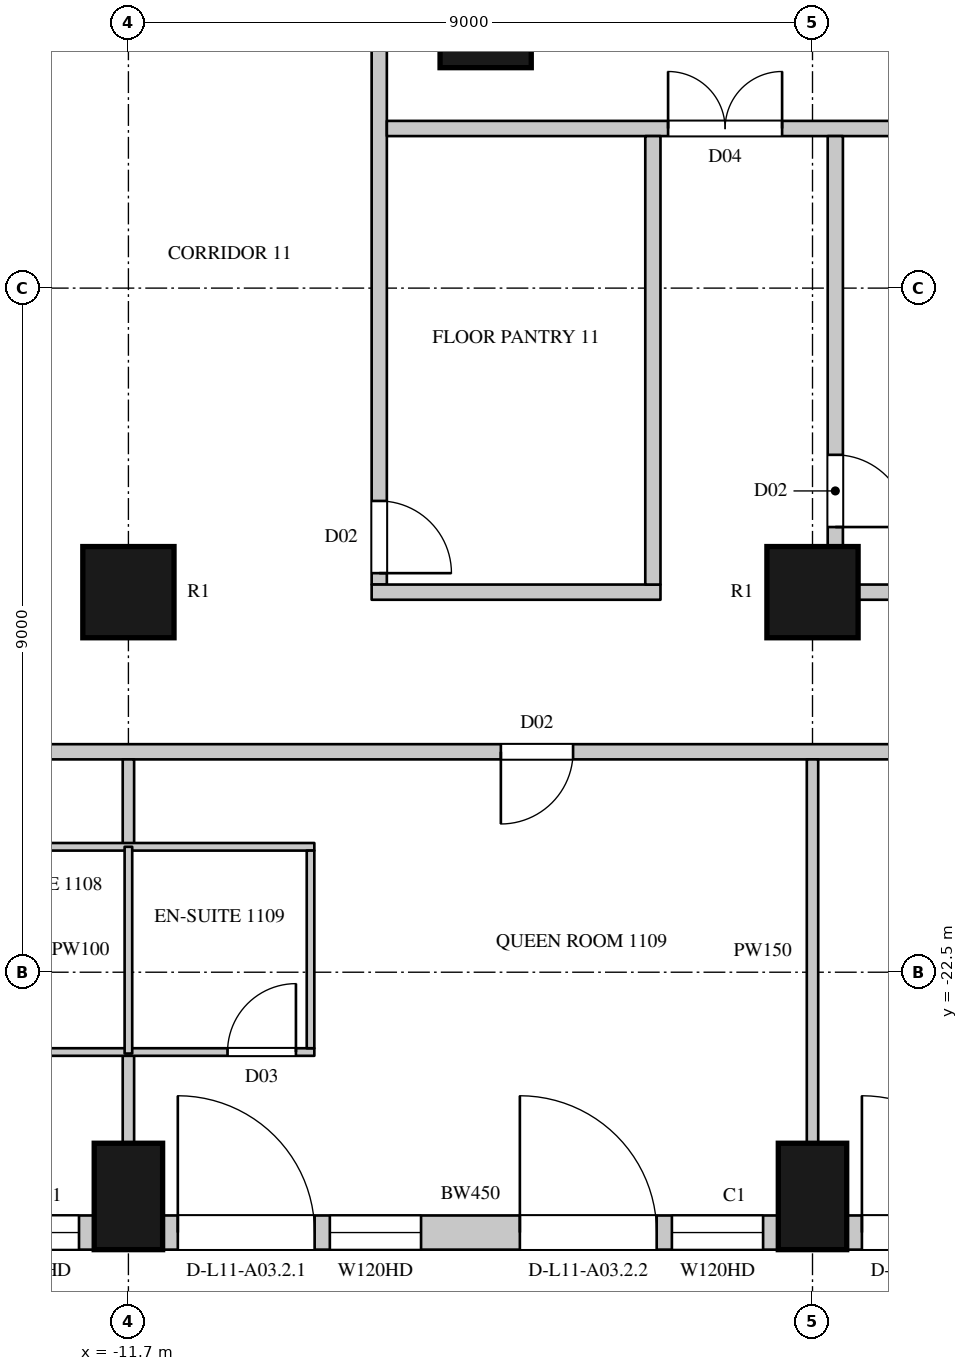
"""IFC4 building model, lengths in metres.
Left out: names, types, materials, properties, quantities, classifications, styles, units other than length and angle.
Written with IfcOpenShell. Run it as: python <this file> out.ifc"""

import sys

from ifc_helpers import new_model, si_unit, direction, frame, frame_2d, origin, origin_2d, place, context, subcontext, project, spatial, rectangle, circle, extrude, element, fill, save


model = new_model("IFC4")
c1 = context("Model", 3, precision=1e-05, world=origin(), true_north=direction((0.0, 1.0)))
c2 = subcontext(c1, "Body", "Model", "MODEL_VIEW")
j1 = project(units=[si_unit("LENGTHUNIT", "METRE"), si_unit("PLANEANGLEUNIT", "RADIAN")], contexts=[c1])
p1 = place(None, origin())
s1 = spatial("IfcSite", under=j1, at=p1, CompositionType="ELEMENT")
p2 = place(p1, origin())
s2 = spatial("IfcBuilding", under=s1, at=p2, CompositionType="ELEMENT")
p3 = place(p2, frame((0.0, 0.0, 69.9)))
s3 = spatial("IfcBuildingStorey", under=s2, at=p3, CompositionType="ELEMENT", Elevation=69.9)
for number, where, z_axis, x_axis in (
    (1, (-11.7, -25.45, 0.0), (0.0, 0.0, 1.0), (1.0, 0.0, 0.0)),
    (2, (-2.7, -25.45, 0.0), (0.0, 0.0, 1.0), (1.0, 0.0, 0.0)),
):
    element("IfcColumn", number, at=place(p3, frame(where, z_axis=z_axis, x_axis=x_axis)), inside=s3, PredefinedType="COLUMN", context=c2, shape_type="SweptSolid", body=[
        extrude(rectangle(XDim=0.9, YDim=1.4, at=origin_2d()), origin(), (0.0, 0.0, 1.0), 3.6),
    ])
for number, where, z_axis, x_axis in (
    (3, (-11.7, -17.5, 0.0), (0.0, 0.0, 1.0), (1.0, 0.0, 0.0)),
    (4, (-2.7, -17.5, 0.0), (0.0, 0.0, 1.0), (1.0, 0.0, 0.0)),
    (5, (-7.0, -10.0, 0.0), (0.0, 0.0, 1.0), (1.0, 0.0, 0.0)),
):
    element("IfcColumn", number, at=place(p3, frame(where, z_axis=z_axis, x_axis=x_axis)), inside=s3, PredefinedType="COLUMN", context=c2, shape_type="SweptSolid", body=[
        extrude(circle(Radius=0.6, at=origin_2d()), origin(), (0.0, 0.0, 1.0), 3.6),
    ])
p4 = place(p3, frame((-20.25, -25.925, 0.0), z_axis=(0.0, 0.0, 1.0), x_axis=(1.0, 0.0, 0.0)))
e6 = element("IfcWall", 6, at=p4, inside=s3, PredefinedType="SOLIDWALL", context=c2, shape_type="SweptSolid", body=[
    extrude(rectangle(XDim=8.1, YDim=0.45, at=frame_2d((4.05, 0.0))), origin(), (0.0, 0.0, 1.0), 3.3),
])
p5 = place(p4, frame((0.2, 0.0, 0.0)))
e7 = element("IfcOpeningElement", 7, at=p5, cuts=e6, PredefinedType="OPENING", context=c2, shape_type="SweptSolid", body=[
    extrude(rectangle(XDim=1.8, YDim=2.4, at=frame_2d((0.9, 1.2))), frame((0.0, 0.235, 0.0), z_axis=(0.0, -1.0, 0.0), x_axis=(1.0, 0.0, 0.0)), (0.0, 0.0, 1.0), 0.47),
])
p6 = place(p4, frame((2.2, 0.0, 1.05)))
e8 = element("IfcOpeningElement", 8, at=p6, cuts=e6, PredefinedType="OPENING", context=c2, shape_type="SweptSolid", body=[
    extrude(rectangle(XDim=1.2, YDim=2.0, at=frame_2d((0.6, 1.0))), frame((0.0, 0.235, 0.0), z_axis=(0.0, -1.0, 0.0), x_axis=(1.0, 0.0, 0.0)), (0.0, 0.0, 1.0), 0.47),
])
p7 = place(p4, frame((4.7, 0.0, 0.0)))
e9 = element("IfcOpeningElement", 9, at=p7, cuts=e6, PredefinedType="OPENING", context=c2, shape_type="SweptSolid", body=[
    extrude(rectangle(XDim=1.8, YDim=2.4, at=frame_2d((0.9, 1.2))), frame((0.0, 0.235, 0.0), z_axis=(0.0, -1.0, 0.0), x_axis=(1.0, 0.0, 0.0)), (0.0, 0.0, 1.0), 0.47),
])
p8 = place(p4, frame((6.7, 0.0, 1.05)))
e10 = element("IfcOpeningElement", 10, at=p8, cuts=e6, PredefinedType="OPENING", context=c2, shape_type="SweptSolid", body=[
    extrude(rectangle(XDim=1.2, YDim=2.0, at=frame_2d((0.6, 1.0))), frame((0.0, 0.235, 0.0), z_axis=(0.0, -1.0, 0.0), x_axis=(1.0, 0.0, 0.0)), (0.0, 0.0, 1.0), 0.47),
])
p9 = place(p3, frame((-11.25, -25.925, 0.0), z_axis=(0.0, 0.0, 1.0), x_axis=(1.0, 0.0, 0.0)))
e11 = element("IfcWall", 11, at=p9, inside=s3, PredefinedType="SOLIDWALL", context=c2, shape_type="SweptSolid", body=[
    extrude(rectangle(XDim=8.1, YDim=0.45, at=frame_2d((4.05, 0.0))), origin(), (0.0, 0.0, 1.0), 3.3),
])
p10 = place(p9, frame((0.2, 0.0, 0.0)))
e12 = element("IfcOpeningElement", 12, at=p10, cuts=e11, PredefinedType="OPENING", context=c2, shape_type="SweptSolid", body=[
    extrude(rectangle(XDim=1.8, YDim=2.4, at=frame_2d((0.9, 1.2))), frame((0.0, 0.235, 0.0), z_axis=(0.0, -1.0, 0.0), x_axis=(1.0, 0.0, 0.0)), (0.0, 0.0, 1.0), 0.47),
])
p11 = place(p9, frame((2.2, 0.0, 1.05)))
e13 = element("IfcOpeningElement", 13, at=p11, cuts=e11, PredefinedType="OPENING", context=c2, shape_type="SweptSolid", body=[
    extrude(rectangle(XDim=1.2, YDim=2.0, at=frame_2d((0.6, 1.0))), frame((0.0, 0.235, 0.0), z_axis=(0.0, -1.0, 0.0), x_axis=(1.0, 0.0, 0.0)), (0.0, 0.0, 1.0), 0.47),
])
p12 = place(p9, frame((4.7, 0.0, 0.0)))
e14 = element("IfcOpeningElement", 14, at=p12, cuts=e11, PredefinedType="OPENING", context=c2, shape_type="SweptSolid", body=[
    extrude(rectangle(XDim=1.8, YDim=2.4, at=frame_2d((0.9, 1.2))), frame((0.0, 0.235, 0.0), z_axis=(0.0, -1.0, 0.0), x_axis=(1.0, 0.0, 0.0)), (0.0, 0.0, 1.0), 0.47),
])
p13 = place(p9, frame((6.7, 0.0, 1.05)))
e15 = element("IfcOpeningElement", 15, at=p13, cuts=e11, PredefinedType="OPENING", context=c2, shape_type="SweptSolid", body=[
    extrude(rectangle(XDim=1.2, YDim=2.0, at=frame_2d((0.6, 1.0))), frame((0.0, 0.235, 0.0), z_axis=(0.0, -1.0, 0.0), x_axis=(1.0, 0.0, 0.0)), (0.0, 0.0, 1.0), 0.47),
])
p14 = place(p3, frame((-2.25, -25.925, 0.0), z_axis=(0.0, 0.0, 1.0), x_axis=(1.0, 0.0, 0.0)))
e16 = element("IfcWall", 16, at=p14, inside=s3, PredefinedType="SOLIDWALL", context=c2, shape_type="SweptSolid", body=[
    extrude(rectangle(XDim=8.1, YDim=0.45, at=frame_2d((4.05, 0.0))), origin(), (0.0, 0.0, 1.0), 3.3),
])
p15 = place(p14, frame((0.2, 0.0, 0.0)))
e17 = element("IfcOpeningElement", 17, at=p15, cuts=e16, PredefinedType="OPENING", context=c2, shape_type="SweptSolid", body=[
    extrude(rectangle(XDim=1.8, YDim=2.4, at=frame_2d((0.9, 1.2))), frame((0.0, 0.235, 0.0), z_axis=(0.0, -1.0, 0.0), x_axis=(1.0, 0.0, 0.0)), (0.0, 0.0, 1.0), 0.47),
])
p16 = place(p14, frame((2.2, 0.0, 1.05)))
e18 = element("IfcOpeningElement", 18, at=p16, cuts=e16, PredefinedType="OPENING", context=c2, shape_type="SweptSolid", body=[
    extrude(rectangle(XDim=1.2, YDim=2.0, at=frame_2d((0.6, 1.0))), frame((0.0, 0.235, 0.0), z_axis=(0.0, -1.0, 0.0), x_axis=(1.0, 0.0, 0.0)), (0.0, 0.0, 1.0), 0.47),
])
p17 = place(p14, frame((4.7, 0.0, 0.0)))
e19 = element("IfcOpeningElement", 19, at=p17, cuts=e16, PredefinedType="OPENING", context=c2, shape_type="SweptSolid", body=[
    extrude(rectangle(XDim=1.8, YDim=2.4, at=frame_2d((0.9, 1.2))), frame((0.0, 0.235, 0.0), z_axis=(0.0, -1.0, 0.0), x_axis=(1.0, 0.0, 0.0)), (0.0, 0.0, 1.0), 0.47),
])
p18 = place(p14, frame((6.7, 0.0, 1.05)))
e20 = element("IfcOpeningElement", 20, at=p18, cuts=e16, PredefinedType="OPENING", context=c2, shape_type="SweptSolid", body=[
    extrude(rectangle(XDim=1.2, YDim=2.0, at=frame_2d((0.6, 1.0))), frame((0.0, 0.235, 0.0), z_axis=(0.0, -1.0, 0.0), x_axis=(1.0, 0.0, 0.0)), (0.0, 0.0, 1.0), 0.47),
])
p19 = place(p3, frame((-20.7, -19.6, 0.0), z_axis=(0.0, 0.0, 1.0), x_axis=(1.0, 0.0, 0.0)))
e21 = element("IfcWall", 21, at=p19, inside=s3, PredefinedType="PARTITIONING", context=c2, shape_type="SweptSolid", body=[
    extrude(rectangle(XDim=38.825, YDim=0.2, at=frame_2d((19.413, 0.0))), origin(), (0.0, 0.0, 1.0), 3.3),
])
p20 = place(p19, frame((3.15, 0.0, 0.0)))
e22 = element("IfcOpeningElement", 22, at=p20, cuts=e21, PredefinedType="OPENING", context=c2, shape_type="SweptSolid", body=[
    extrude(rectangle(XDim=0.95, YDim=2.2, at=frame_2d((0.475, 1.1))), frame((0.0, 0.11, 0.0), z_axis=(0.0, -1.0, 0.0), x_axis=(1.0, 0.0, 0.0)), (0.0, 0.0, 1.0), 0.22),
])
p21 = place(p19, frame((13.9, 0.0, 0.0)))
e23 = element("IfcOpeningElement", 23, at=p21, cuts=e21, PredefinedType="OPENING", context=c2, shape_type="SweptSolid", body=[
    extrude(rectangle(XDim=0.95, YDim=2.2, at=frame_2d((0.475, 1.1))), frame((0.0, 0.11, 0.0), z_axis=(0.0, -1.0, 0.0), x_axis=(1.0, 0.0, 0.0)), (0.0, 0.0, 1.0), 0.22),
])
p22 = place(p19, frame((21.15, 0.0, 0.0)))
e24 = element("IfcOpeningElement", 24, at=p22, cuts=e21, PredefinedType="OPENING", context=c2, shape_type="SweptSolid", body=[
    extrude(rectangle(XDim=0.95, YDim=2.2, at=frame_2d((0.475, 1.1))), frame((0.0, 0.11, 0.0), z_axis=(0.0, -1.0, 0.0), x_axis=(1.0, 0.0, 0.0)), (0.0, 0.0, 1.0), 0.22),
])
p23 = place(p19, frame((29.75, 0.0, 0.0)))
e25 = element("IfcOpeningElement", 25, at=p23, cuts=e21, PredefinedType="OPENING", context=c2, shape_type="SweptSolid", body=[
    extrude(rectangle(XDim=1.1, YDim=2.4, at=frame_2d((0.55, 1.2))), frame((0.0, 0.11, 0.0), z_axis=(0.0, -1.0, 0.0), x_axis=(1.0, 0.0, 0.0)), (0.0, 0.0, 1.0), 0.22),
])
p24 = place(p3, frame((-8.4, -17.4, 0.0), z_axis=(0.0, 0.0, 1.0), x_axis=(0.0, 1.0, 0.0)))
e26 = element("IfcWall", 26, at=p24, inside=s3, PredefinedType="PARTITIONING", context=c2, shape_type="SweptSolid", body=[
    extrude(rectangle(XDim=34.8, YDim=0.2, at=frame_2d((17.4, 0.0))), origin(), (0.0, 0.0, 1.0), 3.3),
])
p25 = place(p24, frame((21.15, 0.0, 0.0)))
e27 = element("IfcOpeningElement", 27, at=p25, cuts=e26, PredefinedType="OPENING", context=c2, shape_type="SweptSolid", body=[
    extrude(rectangle(XDim=1.5, YDim=2.2, at=frame_2d((0.75, 1.1))), frame((0.0, 0.11, 0.0), z_axis=(0.0, -1.0, 0.0), x_axis=(1.0, 0.0, 0.0)), (0.0, 0.0, 1.0), 0.22),
])
p26 = place(p24, frame((33.75, 0.0, 0.0)))
e28 = element("IfcOpeningElement", 28, at=p26, cuts=e26, PredefinedType="OPENING", context=c2, shape_type="SweptSolid", body=[
    extrude(rectangle(XDim=0.9, YDim=2.2, at=frame_2d((0.45, 1.1))), frame((0.0, 0.11, 0.0), z_axis=(0.0, -1.0, 0.0), x_axis=(1.0, 0.0, 0.0)), (0.0, 0.0, 1.0), 0.22),
])
p27 = place(p24, frame((0.15, 0.0, 0.0)))
e29 = element("IfcOpeningElement", 29, at=p27, cuts=e26, PredefinedType="OPENING", context=c2, shape_type="SweptSolid", body=[
    extrude(rectangle(XDim=0.95, YDim=2.2, at=frame_2d((0.475, 1.1))), frame((0.0, 0.11, 0.0), z_axis=(0.0, -1.0, 0.0), x_axis=(1.0, 0.0, 0.0)), (0.0, 0.0, 1.0), 0.22),
])
p28 = place(p3, frame((-8.5, -17.5, 0.0), z_axis=(0.0, 0.0, 1.0), x_axis=(1.0, 0.0, 0.0)))
e30 = element("IfcWall", 30, at=p28, inside=s3, PredefinedType="PARTITIONING", context=c2, shape_type="SweptSolid", body=[
    extrude(rectangle(XDim=3.8, YDim=0.2, at=frame_2d((1.9, 0.0))), origin(), (0.0, 0.0, 1.0), 2.75),
])
p29 = place(p3, frame((-8.3, -11.4, 0.0), z_axis=(0.0, 0.0, 1.0), x_axis=(1.0, 0.0, 0.0)))
e31 = element("IfcWall", 31, at=p29, inside=s3, PredefinedType="PARTITIONING", context=c2, shape_type="SweptSolid", body=[
    extrude(rectangle(XDim=18.6, YDim=0.2, at=frame_2d((9.3, 0.0))), origin(), (0.0, 0.0, 1.0), 3.3),
])
p30 = place(p29, frame((3.7, 0.0, 0.0)))
e32 = element("IfcOpeningElement", 32, at=p30, cuts=e31, PredefinedType="OPENING", context=c2, shape_type="SweptSolid", body=[
    extrude(rectangle(XDim=1.5, YDim=2.2, at=frame_2d((0.75, 1.1))), frame((0.0, 0.11, 0.0), z_axis=(0.0, -1.0, 0.0), x_axis=(1.0, 0.0, 0.0)), (0.0, 0.0, 1.0), 0.22),
])
p31 = place(p3, frame((-4.8, -17.4, 0.0), z_axis=(0.0, 0.0, 1.0), x_axis=(0.0, 1.0, 0.0)))
e33 = element("IfcWall", 33, at=p31, inside=s3, PredefinedType="PARTITIONING", context=c2, shape_type="SweptSolid", body=[
    extrude(rectangle(XDim=5.9, YDim=0.2, at=frame_2d((2.95, 0.0))), origin(), (0.0, 0.0, 1.0), 3.3),
])
p32 = place(p3, frame((-2.4, -16.943, 0.0), z_axis=(0.0, 0.0, 1.0), x_axis=(0.0, 1.0, 0.0)))
e34 = element("IfcWall", 34, at=p32, inside=s3, PredefinedType="PARTITIONING", context=c2, shape_type="SweptSolid", body=[
    extrude(rectangle(XDim=5.443, YDim=0.2, at=frame_2d((2.722, 0.0))), origin(), (0.0, 0.0, 1.0), 3.3),
])
p33 = place(p32, frame((0.3, 0.0, 0.0)))
e35 = element("IfcOpeningElement", 35, at=p33, cuts=e34, PredefinedType="OPENING", context=c2, shape_type="SweptSolid", body=[
    extrude(rectangle(XDim=0.95, YDim=2.2, at=frame_2d((0.475, 1.1))), frame((0.0, 0.11, 0.0), z_axis=(0.0, -1.0, 0.0), x_axis=(1.0, 0.0, 0.0)), (0.0, 0.0, 1.0), 0.22),
])
p34 = place(p3, frame((-2.1, -17.5, 0.0), z_axis=(0.0, 0.0, 1.0), x_axis=(1.0, 0.0, 0.0)))
e36 = element("IfcWall", 36, at=p34, inside=s3, PredefinedType="PARTITIONING", context=c2, shape_type="SweptSolid", body=[
    extrude(rectangle(XDim=7.8, YDim=0.2, at=frame_2d((3.9, 0.0))), origin(), (0.0, 0.0, 1.0), 2.75),
])
p35 = place(p34, frame((6.6, 0.0, 0.0)))
e37 = element("IfcOpeningElement", 37, at=p35, cuts=e36, PredefinedType="OPENING", context=c2, shape_type="SweptSolid", body=[
    extrude(rectangle(XDim=0.9, YDim=2.2, at=frame_2d((0.45, 1.1))), frame((0.0, 0.11, 0.0), z_axis=(0.0, -1.0, 0.0), x_axis=(1.0, 0.0, 0.0)), (0.0, 0.0, 1.0), 0.22),
])
p36 = place(p3, frame((-11.7, -24.75, 0.0), z_axis=(0.0, 0.0, 1.0), x_axis=(0.0, 1.0, 0.0)))
e38 = element("IfcWall", 38, at=p36, inside=s3, PredefinedType="PARTITIONING", context=c2, shape_type="SweptSolid", body=[
    extrude(rectangle(XDim=1.18, YDim=0.15, at=frame_2d((0.59, 0.0))), origin(), (0.0, 0.0, 1.0), 2.75),
])
p37 = place(p3, frame((-11.7, -20.85, 0.0), z_axis=(0.0, 0.0, 1.0), x_axis=(0.0, 1.0, 0.0)))
e39 = element("IfcWall", 39, at=p37, inside=s3, PredefinedType="PARTITIONING", context=c2, shape_type="SweptSolid", body=[
    extrude(rectangle(XDim=1.15, YDim=0.15, at=frame_2d((0.575, 0.0))), origin(), (0.0, 0.0, 1.0), 2.75),
])
p38 = place(p3, frame((-2.7, -24.75, 0.0), z_axis=(0.0, 0.0, 1.0), x_axis=(0.0, 1.0, 0.0)))
e40 = element("IfcWall", 40, at=p38, inside=s3, PredefinedType="PARTITIONING", context=c2, shape_type="SweptSolid", body=[
    extrude(rectangle(XDim=5.05, YDim=0.15, at=frame_2d((2.525, 0.0))), origin(), (0.0, 0.0, 1.0), 2.75),
])
p39 = place(p3, frame((-14.146, -23.55, 0.0), z_axis=(0.0, 0.0, 1.0), x_axis=(1.0, 0.0, 0.0)))
e41 = element("IfcWall", 41, at=p39, inside=s3, PredefinedType="PARTITIONING", context=c2, shape_type="SweptSolid", body=[
    extrude(rectangle(XDim=4.892, YDim=0.1, at=frame_2d((2.446, 0.0))), origin(), (0.0, 0.0, 1.0), 3.3),
])
p40 = place(p39, frame((3.75, 0.0, 0.0)))
e42 = element("IfcOpeningElement", 42, at=p40, cuts=e41, PredefinedType="OPENING", context=c2, shape_type="SweptSolid", body=[
    extrude(rectangle(XDim=0.9, YDim=2.2, at=frame_2d((0.45, 1.1))), frame((0.0, 0.06, 0.0), z_axis=(0.0, -1.0, 0.0), x_axis=(1.0, 0.0, 0.0)), (0.0, 0.0, 1.0), 0.12),
])
p41 = place(p3, frame((-14.146, -20.85, 0.0), z_axis=(0.0, 0.0, 1.0), x_axis=(1.0, 0.0, 0.0)))
e43 = element("IfcWall", 43, at=p41, inside=s3, PredefinedType="PARTITIONING", context=c2, shape_type="SweptSolid", body=[
    extrude(rectangle(XDim=4.892, YDim=0.1, at=frame_2d((2.446, 0.0))), origin(), (0.0, 0.0, 1.0), 3.3),
])
p42 = place(p3, frame((-11.7, -23.57, 0.0), z_axis=(0.0, 0.0, 1.0), x_axis=(0.0, 1.0, 0.0)))
e44 = element("IfcWall", 44, at=p42, inside=s3, PredefinedType="PARTITIONING", context=c2, shape_type="SweptSolid", body=[
    extrude(rectangle(XDim=2.72, YDim=0.1, at=frame_2d((1.36, 0.0))), origin(), (0.0, 0.0, 1.0), 2.75),
])
p43 = place(p3, frame((-9.304, -23.5, 0.0), z_axis=(0.0, 0.0, 1.0), x_axis=(0.0, 1.0, 0.0)))
e45 = element("IfcWall", 45, at=p43, inside=s3, PredefinedType="PARTITIONING", context=c2, shape_type="SweptSolid", body=[
    extrude(rectangle(XDim=2.6, YDim=0.1, at=frame_2d((1.3, 0.0))), origin(), (0.0, 0.0, 1.0), 3.3),
])
p44 = place(p8, origin())
e46 = element("IfcWindow", 46, at=p44, inside=s3, PartitioningType="SINGLE_PANEL", PredefinedType="WINDOW", context=c2, shape_type="SweptSolid", body=[
    extrude(rectangle(XDim=1.2, YDim=2.0, at=frame_2d((0.6, 1.0))), frame((0.0, 0.135, 0.0), z_axis=(0.0, -1.0, 0.0), x_axis=(1.0, 0.0, 0.0)), (0.0, 0.0, 1.0), 0.06),
])
fill(e10, e46)
p45 = place(p10, origin())
e47 = element("IfcDoor", 47, at=p45, inside=s3, OperationType="SLIDING_TO_LEFT", PredefinedType="DOOR", context=c2, shape_type="SweptSolid", body=[
    extrude(rectangle(XDim=1.8, YDim=2.4, at=frame_2d((0.9, 1.2))), frame((0.0, 0.13, 0.0), z_axis=(0.0, -1.0, 0.0), x_axis=(1.0, 0.0, 0.0)), (0.0, 0.0, 1.0), 0.05),
])
fill(e12, e47)
p46 = place(p11, origin())
e48 = element("IfcWindow", 48, at=p46, inside=s3, PartitioningType="SINGLE_PANEL", PredefinedType="WINDOW", context=c2, shape_type="SweptSolid", body=[
    extrude(rectangle(XDim=1.2, YDim=2.0, at=frame_2d((0.6, 1.0))), frame((0.0, 0.135, 0.0), z_axis=(0.0, -1.0, 0.0), x_axis=(1.0, 0.0, 0.0)), (0.0, 0.0, 1.0), 0.06),
])
fill(e13, e48)
p47 = place(p12, origin())
e49 = element("IfcDoor", 49, at=p47, inside=s3, OperationType="SLIDING_TO_LEFT", PredefinedType="DOOR", context=c2, shape_type="SweptSolid", body=[
    extrude(rectangle(XDim=1.8, YDim=2.4, at=frame_2d((0.9, 1.2))), frame((0.0, 0.13, 0.0), z_axis=(0.0, -1.0, 0.0), x_axis=(1.0, 0.0, 0.0)), (0.0, 0.0, 1.0), 0.05),
])
fill(e14, e49)
p48 = place(p13, origin())
e50 = element("IfcWindow", 50, at=p48, inside=s3, PartitioningType="SINGLE_PANEL", PredefinedType="WINDOW", context=c2, shape_type="SweptSolid", body=[
    extrude(rectangle(XDim=1.2, YDim=2.0, at=frame_2d((0.6, 1.0))), frame((0.0, 0.135, 0.0), z_axis=(0.0, -1.0, 0.0), x_axis=(1.0, 0.0, 0.0)), (0.0, 0.0, 1.0), 0.06),
])
fill(e15, e50)
p49 = place(p15, origin())
e51 = element("IfcDoor", 51, at=p49, inside=s3, OperationType="SLIDING_TO_LEFT", PredefinedType="DOOR", context=c2, shape_type="SweptSolid", body=[
    extrude(rectangle(XDim=1.8, YDim=2.4, at=frame_2d((0.9, 1.2))), frame((0.0, 0.13, 0.0), z_axis=(0.0, -1.0, 0.0), x_axis=(1.0, 0.0, 0.0)), (0.0, 0.0, 1.0), 0.05),
])
fill(e17, e51)
p50 = place(p30, origin())
e52 = element("IfcDoor", 52, at=p50, inside=s3, OperationType="DOUBLE_DOOR_SINGLE_SWING", PredefinedType="DOOR", context=c2, shape_type="SweptSolid", body=[
    extrude(rectangle(XDim=1.5, YDim=2.2, at=frame_2d((0.75, 1.1))), frame((0.0, 0.025, 0.0), z_axis=(0.0, -1.0, 0.0), x_axis=(1.0, 0.0, 0.0)), (0.0, 0.0, 1.0), 0.05),
])
fill(e32, e52)
p51 = place(p27, origin())
e53 = element("IfcDoor", 53, at=p51, inside=s3, OperationType="SINGLE_SWING_RIGHT", PredefinedType="DOOR", context=c2, shape_type="SweptSolid", body=[
    extrude(rectangle(XDim=0.95, YDim=2.2, at=frame_2d((0.475, 1.1))), frame((0.0, 0.025, 0.0), z_axis=(0.0, -1.0, 0.0), x_axis=(1.0, 0.0, 0.0)), (0.0, 0.0, 1.0), 0.05),
])
fill(e29, e53)
p52 = place(p33, origin())
e54 = element("IfcDoor", 54, at=p52, inside=s3, OperationType="SINGLE_SWING_RIGHT", PredefinedType="DOOR", context=c2, shape_type="SweptSolid", body=[
    extrude(rectangle(XDim=0.95, YDim=2.2, at=frame_2d((0.475, 1.1))), frame((0.0, 0.025, 0.0), z_axis=(0.0, -1.0, 0.0), x_axis=(1.0, 0.0, 0.0)), (0.0, 0.0, 1.0), 0.05),
])
fill(e35, e54)
p53 = place(p21, origin())
e55 = element("IfcDoor", 55, at=p53, inside=s3, OperationType="SINGLE_SWING_RIGHT", PredefinedType="DOOR", context=c2, shape_type="SweptSolid", body=[
    extrude(rectangle(XDim=0.95, YDim=2.2, at=frame_2d((0.475, 1.1))), frame((0.0, 0.025, 0.0), z_axis=(0.0, -1.0, 0.0), x_axis=(1.0, 0.0, 0.0)), (0.0, 0.0, 1.0), 0.05),
])
fill(e23, e55)
p54 = place(p40, origin())
e56 = element("IfcDoor", 56, at=p54, inside=s3, OperationType="SINGLE_SWING_RIGHT", PredefinedType="DOOR", context=c2, shape_type="SweptSolid", body=[
    extrude(rectangle(XDim=0.9, YDim=2.2, at=frame_2d((0.45, 1.1))), frame((0.0, 0.025, 0.0), z_axis=(0.0, -1.0, 0.0), x_axis=(1.0, 0.0, 0.0)), (0.0, 0.0, 1.0), 0.05),
])
fill(e42, e56)
save(model, sys.argv[1])
